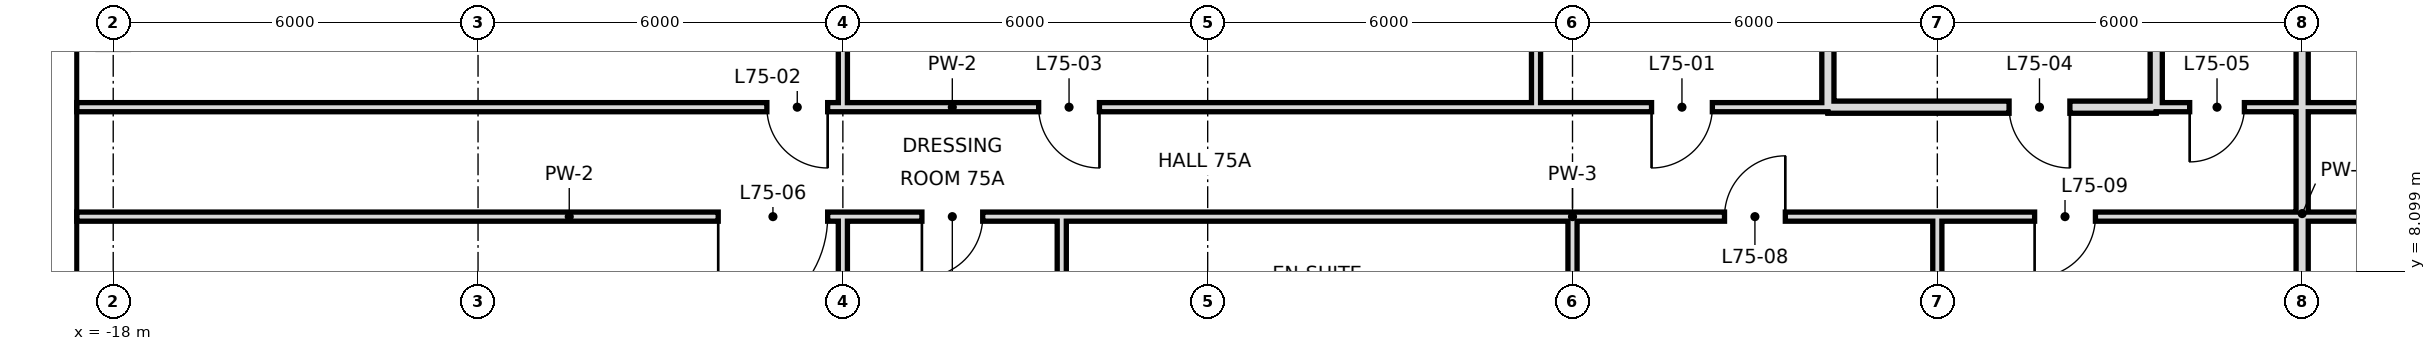
"""IFC4 building model, lengths in metres.
Left out: names, types, materials, properties, quantities, classifications, styles, units other than length and angle.
Written with IfcOpenShell. Run it as: python <this file> out.ifc"""

import sys

from ifc_helpers import new_model, si_unit, direction, frame, frame_2d, origin, place, context, subcontext, project, spatial, rectangle, extrude, element, fill, save


model = new_model("IFC4")
c1 = context("Model", 3, precision=1e-05, world=origin(), true_north=direction((0.0, 1.0)))
c2 = subcontext(c1, "Body", "Model", "MODEL_VIEW")
j1 = project(units=[si_unit("LENGTHUNIT", "METRE"), si_unit("PLANEANGLEUNIT", "RADIAN")], contexts=[c1])
p1 = place(None, origin())
s1 = spatial("IfcSite", under=j1, at=p1, CompositionType="ELEMENT")
p2 = place(p1, origin())
s2 = spatial("IfcBuilding", under=s1, at=p2, CompositionType="ELEMENT")
p3 = place(p2, frame((0.0, 0.0, 316.0)))
s3 = spatial("IfcBuildingStorey", under=s2, at=p3, CompositionType="ELEMENT", Elevation=316.0)
p4 = place(p3, frame((-2.4, 6.0, 0.0), z_axis=(0.0, 0.0, 1.0), x_axis=(0.0, 1.0, 0.0)))
e1 = element("IfcWall", 1, at=p4, inside=s3, PredefinedType="PARTITIONING", context=c2, shape_type="SweptSolid", body=[
    extrude(rectangle(XDim=3.0, YDim=0.15, at=frame_2d((1.5, 0.0))), origin(), (0.0, 0.0, 1.0), 3.42),
])
p5 = place(p3, frame((-6.0, -0.6, 0.0), z_axis=(0.0, 0.0, 1.0), x_axis=(0.0, 1.0, 0.0)))
e2 = element("IfcWall", 2, at=p5, inside=s3, PredefinedType="PARTITIONING", context=c2, shape_type="SweptSolid", body=[
    extrude(rectangle(XDim=9.6, YDim=0.15, at=frame_2d((4.8, 0.0))), origin(), (0.0, 0.0, 1.0), 3.42),
])
p6 = place(p3, frame((-6.0, 10.8, 0.0), z_axis=(0.0, 0.0, 1.0), x_axis=(0.0, 1.0, 0.0)))
e3 = element("IfcWall", 3, at=p6, inside=s3, PredefinedType="PARTITIONING", context=c2, shape_type="SweptSolid", body=[
    extrude(rectangle(XDim=7.2, YDim=0.15, at=frame_2d((3.6, 0.0))), origin(), (0.0, 0.0, 1.0), 3.42),
])
p7 = place(p3, frame((10.2, 10.8, 0.0), z_axis=(0.0, 0.0, 1.0), x_axis=(0.0, 1.0, 0.0)))
e4 = element("IfcWall", 4, at=p7, inside=s3, PredefinedType="SOLIDWALL", context=c2, shape_type="SweptSolid", body=[
    extrude(rectangle(XDim=7.9, YDim=0.2, at=frame_2d((3.95, 0.0))), origin(), (0.0, 0.0, 1.0), 2.72),
])
p8 = place(p3, frame((12.0, 0.0, 0.0), z_axis=(0.0, 0.0, 1.0), x_axis=(0.0, 1.0, 0.0)))
e5 = element("IfcWall", 5, at=p8, inside=s3, PredefinedType="PARTITIONING", context=c2, shape_type="SweptSolid", body=[
    extrude(rectangle(XDim=9.0, YDim=0.15, at=frame_2d((4.5, 0.0))), origin(), (0.0, 0.0, 1.0), 2.72),
])
p9 = place(p3, frame((15.6, 10.8, 0.0), z_axis=(0.0, 0.0, 1.0), x_axis=(0.0, 1.0, 0.0)))
e6 = element("IfcWall", 6, at=p9, inside=s3, PredefinedType="SOLIDWALL", context=c2, shape_type="SweptSolid", body=[
    extrude(rectangle(XDim=7.9, YDim=0.2, at=frame_2d((3.95, 0.0))), origin(), (0.0, 0.0, 1.0), 2.72),
])
p10 = place(p3, frame((18.0, -0.6, 0.0), z_axis=(0.0, 0.0, 1.0), x_axis=(0.0, 1.0, 0.0)))
e7 = element("IfcWall", 7, at=p10, inside=s3, PredefinedType="SOLIDWALL", context=c2, shape_type="SweptSolid", body=[
    extrude(rectangle(XDim=19.3, YDim=0.2, at=frame_2d((9.65, 0.0))), origin(), (0.0, 0.0, 1.0), 2.72),
])
p11 = place(p3, frame((5.4, 10.8, 0.0), z_axis=(0.0, 0.0, 1.0), x_axis=(0.0, 1.0, 0.0)))
e8 = element("IfcWall", 8, at=p11, inside=s3, PredefinedType="PARTITIONING", context=c2, shape_type="SweptSolid", body=[
    extrude(rectangle(XDim=7.9, YDim=0.15, at=frame_2d((3.95, 0.0))), origin(), (0.0, 0.0, 1.0), 3.42),
])
p12 = place(p3, frame((6.0, 6.0, 0.0), z_axis=(0.0, 0.0, 1.0), x_axis=(0.0, 1.0, 0.0)))
e9 = element("IfcWall", 9, at=p12, inside=s3, PredefinedType="PARTITIONING", context=c2, shape_type="SweptSolid", body=[
    extrude(rectangle(XDim=3.0, YDim=0.15, at=frame_2d((1.5, 0.0))), origin(), (0.0, 0.0, 1.0), 3.42),
])
p13 = place(p3, frame((10.2, 10.8, 0.0), z_axis=(0.0, 0.0, 1.0), x_axis=(1.0, 0.0, 0.0)))
e10 = element("IfcWall", 10, at=p13, inside=s3, PredefinedType="SOLIDWALL", context=c2, shape_type="SweptSolid", body=[
    extrude(rectangle(XDim=5.4, YDim=0.2, at=frame_2d((2.7, 0.0))), origin(), (0.0, 0.0, 1.0), 2.72),
])
p14 = place(p13, frame((2.98, 0.0, 0.0)))
e11 = element("IfcOpeningElement", 11, at=p14, cuts=e10, PredefinedType="OPENING", context=c2, shape_type="SweptSolid", body=[
    extrude(rectangle(XDim=1.0, YDim=2.4, at=frame_2d((0.5, 1.2))), frame((0.0, 0.11, 0.0), z_axis=(0.0, -1.0, 0.0), x_axis=(1.0, 0.0, 0.0)), (0.0, 0.0, 1.0), 0.22),
])
p15 = place(p3, frame((-18.6, 10.8, 0.0), z_axis=(0.0, 0.0, 1.0), x_axis=(1.0, 0.0, 0.0)))
e12 = element("IfcWall", 12, at=p15, inside=s3, PredefinedType="PARTITIONING", context=c2, shape_type="SweptSolid", body=[
    extrude(rectangle(XDim=28.8, YDim=0.15, at=frame_2d((14.4, 0.0))), origin(), (0.0, 0.0, 1.0), 3.42),
])
p16 = place(p15, frame((25.9, 0.0, 0.0)))
e13 = element("IfcOpeningElement", 13, at=p16, cuts=e12, PredefinedType="OPENING", context=c2, shape_type="SweptSolid", body=[
    extrude(rectangle(XDim=1.0, YDim=2.4, at=frame_2d((0.5, 1.2))), frame((0.0, 0.085, 0.0), z_axis=(0.0, -1.0, 0.0), x_axis=(1.0, 0.0, 0.0)), (0.0, 0.0, 1.0), 0.17),
])
p17 = place(p15, frame((11.35, 0.0, 0.0)))
e14 = element("IfcOpeningElement", 14, at=p17, cuts=e12, PredefinedType="OPENING", context=c2, shape_type="SweptSolid", body=[
    extrude(rectangle(XDim=1.0, YDim=2.4, at=frame_2d((0.5, 1.2))), frame((0.0, 0.085, 0.0), z_axis=(0.0, -1.0, 0.0), x_axis=(1.0, 0.0, 0.0)), (0.0, 0.0, 1.0), 0.17),
])
p18 = place(p15, frame((15.82, 0.0, 0.0)))
e15 = element("IfcOpeningElement", 15, at=p18, cuts=e12, PredefinedType="OPENING", context=c2, shape_type="SweptSolid", body=[
    extrude(rectangle(XDim=1.0, YDim=2.4, at=frame_2d((0.5, 1.2))), frame((0.0, 0.085, 0.0), z_axis=(0.0, -1.0, 0.0), x_axis=(1.0, 0.0, 0.0)), (0.0, 0.0, 1.0), 0.17),
])
p19 = place(p3, frame((18.0, 10.8, 0.0), z_axis=(0.0, 0.0, 1.0), x_axis=(1.0, 0.0, 0.0)))
e16 = element("IfcWall", 16, at=p19, inside=s3, PredefinedType="PARTITIONING", context=c2, shape_type="SweptSolid", body=[
    extrude(rectangle(XDim=22.2, YDim=0.15, at=frame_2d((11.1, 0.0))), origin(), (0.0, 0.0, 1.0), 3.42),
])
p20 = place(p19, frame((19.3, 0.0, 0.0)))
e17 = element("IfcOpeningElement", 17, at=p20, cuts=e16, PredefinedType="OPENING", context=c2, shape_type="SweptSolid", body=[
    extrude(rectangle(XDim=1.0, YDim=2.4, at=frame_2d((0.5, 1.2))), frame((0.0, 0.085, 0.0), z_axis=(0.0, -1.0, 0.0), x_axis=(1.0, 0.0, 0.0)), (0.0, 0.0, 1.0), 0.17),
])
p21 = place(p19, frame((2.5, 0.0, 0.0)))
e18 = element("IfcOpeningElement", 18, at=p21, cuts=e16, PredefinedType="OPENING", context=c2, shape_type="SweptSolid", body=[
    extrude(rectangle(XDim=1.0, YDim=2.4, at=frame_2d((0.5, 1.2))), frame((0.0, 0.085, 0.0), z_axis=(0.0, -1.0, 0.0), x_axis=(1.0, 0.0, 0.0)), (0.0, 0.0, 1.0), 0.17),
])
p22 = place(p19, frame((12.7, 0.0, 0.0)))
e19 = element("IfcOpeningElement", 19, at=p22, cuts=e16, PredefinedType="OPENING", context=c2, shape_type="SweptSolid", body=[
    extrude(rectangle(XDim=1.0, YDim=2.4, at=frame_2d((0.5, 1.2))), frame((0.0, 0.085, 0.0), z_axis=(0.0, -1.0, 0.0), x_axis=(1.0, 0.0, 0.0)), (0.0, 0.0, 1.0), 0.17),
])
p23 = place(p3, frame((15.6, 10.8, 0.0), z_axis=(0.0, 0.0, 1.0), x_axis=(1.0, 0.0, 0.0)))
e20 = element("IfcWall", 20, at=p23, inside=s3, PredefinedType="PARTITIONING", context=c2, shape_type="SweptSolid", body=[
    extrude(rectangle(XDim=2.4, YDim=0.15, at=frame_2d((1.2, 0.0))), origin(), (0.0, 0.0, 1.0), 3.42),
])
p24 = place(p23, frame((0.55, 0.0, 0.0)))
e21 = element("IfcOpeningElement", 21, at=p24, cuts=e20, PredefinedType="OPENING", context=c2, shape_type="SweptSolid", body=[
    extrude(rectangle(XDim=0.9, YDim=2.4, at=frame_2d((0.45, 1.2))), frame((0.0, 0.085, 0.0), z_axis=(0.0, -1.0, 0.0), x_axis=(1.0, 0.0, 0.0)), (0.0, 0.0, 1.0), 0.17),
])
p25 = place(p3, frame((-18.6, 9.0, 0.0), z_axis=(0.0, 0.0, 1.0), x_axis=(1.0, 0.0, 0.0)))
e22 = element("IfcWall", 22, at=p25, inside=s3, PredefinedType="PARTITIONING", context=c2, shape_type="SweptSolid", body=[
    extrude(rectangle(XDim=16.2, YDim=0.15, at=frame_2d((8.1, 0.0))), origin(), (0.0, 0.0, 1.0), 3.42),
])
p26 = place(p25, frame((10.55, 0.0, 0.0)))
e23 = element("IfcOpeningElement", 23, at=p26, cuts=e22, PredefinedType="OPENING", context=c2, shape_type="SweptSolid", body=[
    extrude(rectangle(XDim=1.8, YDim=2.4, at=frame_2d((0.9, 1.2))), frame((0.0, 0.085, 0.0), z_axis=(0.0, -1.0, 0.0), x_axis=(1.0, 0.0, 0.0)), (0.0, 0.0, 1.0), 0.17),
])
p27 = place(p25, frame((13.9, 0.0, 0.0)))
e24 = element("IfcOpeningElement", 24, at=p27, cuts=e22, PredefinedType="OPENING", context=c2, shape_type="SweptSolid", body=[
    extrude(rectangle(XDim=1.0, YDim=2.4, at=frame_2d((0.5, 1.2))), frame((0.0, 0.085, 0.0), z_axis=(0.0, -1.0, 0.0), x_axis=(1.0, 0.0, 0.0)), (0.0, 0.0, 1.0), 0.17),
])
p28 = place(p3, frame((6.0, 9.0, 0.0), z_axis=(0.0, 0.0, 1.0), x_axis=(1.0, 0.0, 0.0)))
e25 = element("IfcWall", 25, at=p28, inside=s3, PredefinedType="PARTITIONING", context=c2, shape_type="SweptSolid", body=[
    extrude(rectangle(XDim=30.0, YDim=0.15, at=frame_2d((15.0, 0.0))), origin(), (0.0, 0.0, 1.0), 3.42),
])
p29 = place(p28, frame((2.5, 0.0, 0.0)))
e26 = element("IfcOpeningElement", 26, at=p29, cuts=e25, PredefinedType="OPENING", context=c2, shape_type="SweptSolid", body=[
    extrude(rectangle(XDim=1.0, YDim=2.4, at=frame_2d((0.5, 1.2))), frame((0.0, 0.085, 0.0), z_axis=(0.0, -1.0, 0.0), x_axis=(1.0, 0.0, 0.0)), (0.0, 0.0, 1.0), 0.17),
])
p30 = place(p28, frame((7.6, 0.0, 0.0)))
e27 = element("IfcOpeningElement", 27, at=p30, cuts=e25, PredefinedType="OPENING", context=c2, shape_type="SweptSolid", body=[
    extrude(rectangle(XDim=1.0, YDim=2.4, at=frame_2d((0.5, 1.2))), frame((0.0, 0.085, 0.0), z_axis=(0.0, -1.0, 0.0), x_axis=(1.0, 0.0, 0.0)), (0.0, 0.0, 1.0), 0.17),
])
p31 = place(p28, frame((15.4, 0.0, 0.0)))
e28 = element("IfcOpeningElement", 28, at=p31, cuts=e25, PredefinedType="OPENING", context=c2, shape_type="SweptSolid", body=[
    extrude(rectangle(XDim=1.0, YDim=2.4, at=frame_2d((0.5, 1.2))), frame((0.0, 0.085, 0.0), z_axis=(0.0, -1.0, 0.0), x_axis=(1.0, 0.0, 0.0)), (0.0, 0.0, 1.0), 0.17),
])
p32 = place(p28, frame((25.04, 0.0, 0.0)))
e29 = element("IfcOpeningElement", 29, at=p32, cuts=e25, PredefinedType="OPENING", context=c2, shape_type="SweptSolid", body=[
    extrude(rectangle(XDim=1.8, YDim=2.4, at=frame_2d((0.9, 1.2))), frame((0.0, 0.085, 0.0), z_axis=(0.0, -1.0, 0.0), x_axis=(1.0, 0.0, 0.0)), (0.0, 0.0, 1.0), 0.17),
])
p33 = place(p3, frame((-2.4, 9.0, 0.0), z_axis=(0.0, 0.0, 1.0), x_axis=(1.0, 0.0, 0.0)))
e30 = element("IfcWall", 30, at=p33, inside=s3, PredefinedType="PARTITIONING", context=c2, shape_type="SweptSolid", body=[
    extrude(rectangle(XDim=8.4, YDim=0.15, at=frame_2d((4.2, 0.0))), origin(), (0.0, 0.0, 1.0), 3.42),
])
p34 = place(p16, frame((1.0, 0.0, 0.0), z_axis=(0.0, 0.0, 1.0), x_axis=(-1.0, 0.0, 0.0)))
e31 = element("IfcDoor", 31, at=p34, inside=s3, OperationType="SINGLE_SWING_RIGHT", PredefinedType="DOOR", context=c2, shape_type="SweptSolid", body=[
    extrude(rectangle(XDim=1.0, YDim=2.4, at=frame_2d((0.5, 1.2))), frame((0.0, 0.025, 0.0), z_axis=(0.0, -1.0, 0.0), x_axis=(1.0, 0.0, 0.0)), (0.0, 0.0, 1.0), 0.05),
])
fill(e13, e31)
p35 = place(p17, origin())
e32 = element("IfcDoor", 32, at=p35, inside=s3, OperationType="SINGLE_SWING_RIGHT", PredefinedType="DOOR", context=c2, shape_type="SweptSolid", body=[
    extrude(rectangle(XDim=1.0, YDim=2.4, at=frame_2d((0.5, 1.2))), frame((0.0, 0.025, 0.0), z_axis=(0.0, -1.0, 0.0), x_axis=(1.0, 0.0, 0.0)), (0.0, 0.0, 1.0), 0.05),
])
fill(e14, e32)
p36 = place(p18, origin())
e33 = element("IfcDoor", 33, at=p36, inside=s3, OperationType="SINGLE_SWING_RIGHT", PredefinedType="DOOR", context=c2, shape_type="SweptSolid", body=[
    extrude(rectangle(XDim=1.0, YDim=2.4, at=frame_2d((0.5, 1.2))), frame((0.0, 0.025, 0.0), z_axis=(0.0, -1.0, 0.0), x_axis=(1.0, 0.0, 0.0)), (0.0, 0.0, 1.0), 0.05),
])
fill(e15, e33)
p37 = place(p14, origin())
e34 = element("IfcDoor", 34, at=p37, inside=s3, OperationType="SINGLE_SWING_RIGHT", PredefinedType="DOOR", context=c2, shape_type="SweptSolid", body=[
    extrude(rectangle(XDim=1.0, YDim=2.4, at=frame_2d((0.5, 1.2))), frame((0.0, 0.025, 0.0), z_axis=(0.0, -1.0, 0.0), x_axis=(1.0, 0.0, 0.0)), (0.0, 0.0, 1.0), 0.05),
])
fill(e11, e34)
p38 = place(p24, frame((0.9, 0.0, 0.0), z_axis=(0.0, 0.0, 1.0), x_axis=(-1.0, 0.0, 0.0)))
e35 = element("IfcDoor", 35, at=p38, inside=s3, OperationType="SINGLE_SWING_RIGHT", PredefinedType="DOOR", context=c2, shape_type="SweptSolid", body=[
    extrude(rectangle(XDim=0.9, YDim=2.4, at=frame_2d((0.45, 1.2))), frame((0.0, 0.025, 0.0), z_axis=(0.0, -1.0, 0.0), x_axis=(1.0, 0.0, 0.0)), (0.0, 0.0, 1.0), 0.05),
])
fill(e21, e35)
p39 = place(p26, frame((1.8, 0.0, 0.0), z_axis=(0.0, 0.0, 1.0), x_axis=(-1.0, 0.0, 0.0)))
e36 = element("IfcDoor", 36, at=p39, inside=s3, OperationType="SINGLE_SWING_RIGHT", PredefinedType="DOOR", context=c2, shape_type="SweptSolid", body=[
    extrude(rectangle(XDim=1.8, YDim=2.4, at=frame_2d((0.9, 1.2))), frame((0.0, 0.025, 0.0), z_axis=(0.0, -1.0, 0.0), x_axis=(1.0, 0.0, 0.0)), (0.0, 0.0, 1.0), 0.05),
])
fill(e23, e36)
p40 = place(p27, frame((1.0, 0.0, 0.0), z_axis=(0.0, 0.0, 1.0), x_axis=(-1.0, 0.0, 0.0)))
e37 = element("IfcDoor", 37, at=p40, inside=s3, OperationType="SINGLE_SWING_RIGHT", PredefinedType="DOOR", context=c2, shape_type="SweptSolid", body=[
    extrude(rectangle(XDim=1.0, YDim=2.4, at=frame_2d((0.5, 1.2))), frame((0.0, 0.025, 0.0), z_axis=(0.0, -1.0, 0.0), x_axis=(1.0, 0.0, 0.0)), (0.0, 0.0, 1.0), 0.05),
])
fill(e24, e37)
p41 = place(p29, frame((1.0, 0.0, 0.0), z_axis=(0.0, 0.0, 1.0), x_axis=(-1.0, 0.0, 0.0)))
e38 = element("IfcDoor", 38, at=p41, inside=s3, OperationType="SINGLE_SWING_LEFT", PredefinedType="DOOR", context=c2, shape_type="SweptSolid", body=[
    extrude(rectangle(XDim=1.0, YDim=2.4, at=frame_2d((0.5, 1.2))), frame((0.0, 0.025, 0.0), z_axis=(0.0, -1.0, 0.0), x_axis=(1.0, 0.0, 0.0)), (0.0, 0.0, 1.0), 0.05),
])
fill(e26, e38)
p42 = place(p30, frame((1.0, 0.0, 0.0), z_axis=(0.0, 0.0, 1.0), x_axis=(-1.0, 0.0, 0.0)))
e39 = element("IfcDoor", 39, at=p42, inside=s3, OperationType="SINGLE_SWING_RIGHT", PredefinedType="DOOR", context=c2, shape_type="SweptSolid", body=[
    extrude(rectangle(XDim=1.0, YDim=2.4, at=frame_2d((0.5, 1.2))), frame((0.0, 0.025, 0.0), z_axis=(0.0, -1.0, 0.0), x_axis=(1.0, 0.0, 0.0)), (0.0, 0.0, 1.0), 0.05),
])
fill(e27, e39)
save(model, sys.argv[1])
